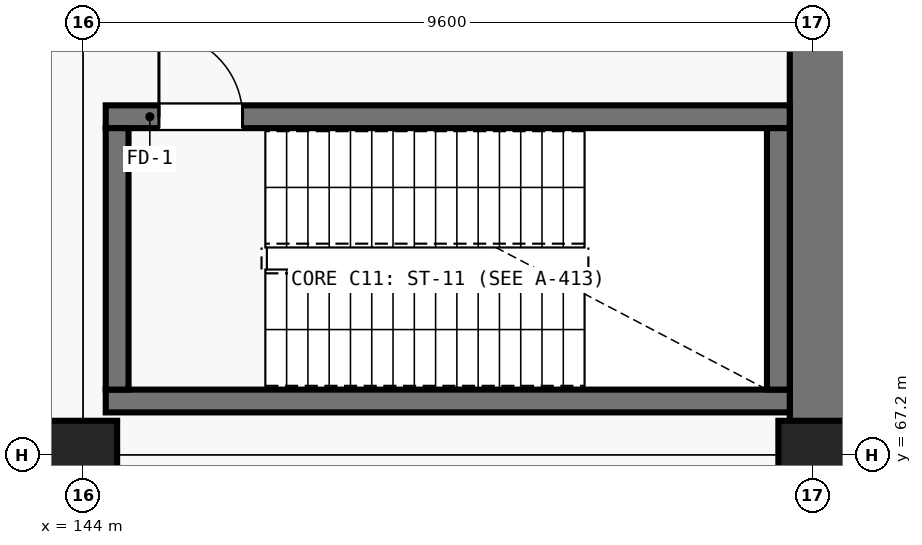
"""IFC4 building model, lengths in metres.
Left out: names, types, materials, properties, quantities, classifications, styles, units other than length and angle.
Written with IfcOpenShell. Run it as: python <this file> out.ifc"""

import sys

from ifc_helpers import new_model, si_unit, direction, frame, frame_2d, origin, origin_2d, place, context, subcontext, project, spatial, rectangle, extrude, element, fill, save


model = new_model("IFC4")
c1 = context("Model", 3, precision=1e-05, world=origin(), true_north=direction((0.0, 1.0)))
c2 = subcontext(c1, "Body", "Model", "MODEL_VIEW")
j1 = project(units=[si_unit("LENGTHUNIT", "METRE"), si_unit("PLANEANGLEUNIT", "RADIAN")], contexts=[c1])
p1 = place(None, origin())
s1 = spatial("IfcSite", under=j1, at=p1, CompositionType="ELEMENT")
p2 = place(p1, origin())
s2 = spatial("IfcBuilding", under=s1, at=p2, CompositionType="ELEMENT")
p3 = place(p2, frame((0.0, 0.0, -5.4)))
s3 = spatial("IfcBuildingStorey", under=s2, at=p3, CompositionType="ELEMENT", Elevation=-5.4)
p4 = place(p3, frame((153.7, 76.9, 0.0), z_axis=(0.0, 0.0, 1.0), x_axis=(0.0, -1.0, 0.0)))
e1 = element("IfcWall", 1, at=p4, inside=s3, PredefinedType="SOLIDWALL", context=c2, shape_type="SweptSolid", body=[
    extrude(rectangle(XDim=38.6, YDim=0.8, at=frame_2d((19.3, 0.0))), origin(), (0.0, 0.0, 1.0), 5.0),
])
for number, where, z_axis, x_axis in (
    (2, (144.0, 67.2, 0.0), (0.0, 0.0, 1.0), (1.0, 0.0, 0.0)),
    (3, (153.6, 67.2, 0.0), (0.0, 0.0, 1.0), (1.0, 0.0, 0.0)),
):
    element("IfcColumn", number, at=place(p3, frame(where, z_axis=z_axis, x_axis=x_axis)), inside=s3, PredefinedType="COLUMN", context=c2, shape_type="SweptSolid", body=[
        extrude(rectangle(XDim=0.9, YDim=0.9, at=origin_2d()), origin(), (0.0, 0.0, 1.0), 5.0),
    ])
p5 = place(p3, frame((144.3, 67.91, 0.0), z_axis=(0.0, 0.0, 1.0), x_axis=(1.0, 0.0, 0.0)))
e4 = element("IfcWall", 4, at=p5, inside=s3, PredefinedType="SHEAR", context=c2, shape_type="SweptSolid", body=[
    extrude(rectangle(XDim=9.0, YDim=0.3, at=frame_2d((4.5, 0.0))), origin(), (0.0, 0.0, 1.0), 5.0),
])
p6 = place(p3, frame((153.3, 71.65, 0.0), z_axis=(0.0, 0.0, 1.0), x_axis=(-1.0, 0.0, 0.0)))
e5 = element("IfcWall", 5, at=p6, inside=s3, PredefinedType="SHEAR", context=c2, shape_type="SweptSolid", body=[
    extrude(rectangle(XDim=9.0, YDim=0.3, at=frame_2d((4.5, 0.0))), origin(), (0.0, 0.0, 1.0), 5.0),
])
p7 = place(p6, frame((7.2, 0.0, 0.0)))
e6 = element("IfcOpeningElement", 6, at=p7, cuts=e5, PredefinedType="OPENING", context=c2, shape_type="SweptSolid", body=[
    extrude(rectangle(XDim=1.1, YDim=2.15, at=frame_2d((0.55, 1.075))), frame((0.0, 0.16, 0.0), z_axis=(0.0, -1.0, 0.0), x_axis=(1.0, 0.0, 0.0)), (0.0, 0.0, 1.0), 0.32),
])
for number, where, z_axis, x_axis in (
    (7, (144.45, 68.06, 0.0), (0.0, 0.0, 1.0), (0.0, 1.0, 0.0)),
    (8, (153.15, 71.5, 0.0), (0.0, 0.0, 1.0), (0.0, -1.0, 0.0)),
):
    element("IfcWall", number, at=place(p3, frame(where, z_axis=z_axis, x_axis=x_axis)), inside=s3, PredefinedType="SHEAR", context=c2, shape_type="SweptSolid", body=[
        extrude(rectangle(XDim=3.44, YDim=0.3, at=frame_2d((1.72, 0.0))), origin(), (0.0, 0.0, 1.0), 5.0),
    ])
p8 = place(p7, frame((1.1, 0.0, 0.0), z_axis=(0.0, 0.0, 1.0), x_axis=(-1.0, 0.0, 0.0)))
e9 = element("IfcDoor", 9, at=p8, inside=s3, OperationType="SINGLE_SWING_RIGHT", PredefinedType="DOOR", context=c2, shape_type="SweptSolid", body=[
    extrude(rectangle(XDim=1.1, YDim=2.15, at=frame_2d((0.55, 1.075))), frame((0.0, 0.025, 0.0), z_axis=(0.0, -1.0, 0.0), x_axis=(1.0, 0.0, 0.0)), (0.0, 0.0, 1.0), 0.05),
])
fill(e6, e9)
save(model, sys.argv[1])
